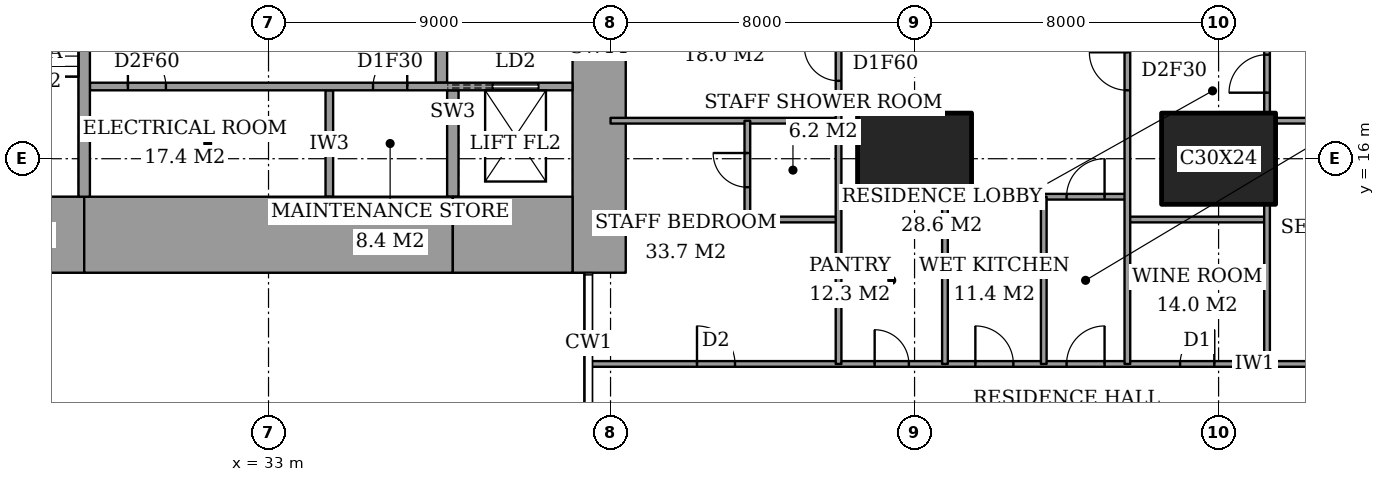
"""IFC4 building model, lengths in metres.
Left out: names, types, materials, properties, quantities, classifications, styles, units other than length and angle.
Written with IfcOpenShell. Run it as: python <this file> out.ifc"""

import sys

from ifc_helpers import new_model, si_unit, direction, frame, frame_2d, origin, origin_2d, place, context, subcontext, project, spatial, rectangle, extrude, element, fill, save


model = new_model("IFC4")
c1 = context("Model", 3, precision=1e-05, world=origin(), true_north=direction((0.0, 1.0)))
c2 = subcontext(c1, "Body", "Model", "MODEL_VIEW")
j1 = project(units=[si_unit("LENGTHUNIT", "METRE"), si_unit("PLANEANGLEUNIT", "RADIAN")], contexts=[c1])
p1 = place(None, origin())
s1 = spatial("IfcSite", under=j1, at=p1, CompositionType="ELEMENT")
p2 = place(p1, origin())
s2 = spatial("IfcBuilding", under=s1, at=p2, CompositionType="ELEMENT")
p3 = place(p2, frame((0.0, 0.0, 287.1)))
s3 = spatial("IfcBuildingStorey", under=s2, at=p3, CompositionType="ELEMENT", Elevation=287.1)
for number, where, z_axis, x_axis in (
    (1, (50.0, 16.0, 0.0), (0.0, 0.0, 1.0), (1.0, 0.0, 0.0)),
    (2, (58.0, 16.0, 0.0), (0.0, 0.0, 1.0), (1.0, 0.0, 0.0)),
):
    element("IfcColumn", number, at=place(p3, frame(where, z_axis=z_axis, x_axis=x_axis)), inside=s3, PredefinedType="COLUMN", context=c2, shape_type="SweptSolid", body=[
        extrude(rectangle(XDim=3.0, YDim=2.4, at=origin_2d()), origin(), (0.0, 0.0, 1.0), 4.5),
    ])
p4 = place(p3, frame((25.0, 14.0, 0.0), z_axis=(0.0, 0.0, 1.0), x_axis=(1.0, 0.0, 0.0)))
e3 = element("IfcWall", 3, at=p4, inside=s3, PredefinedType="SHEAR", context=c2, shape_type="SweptSolid", body=[
    extrude(rectangle(XDim=3.15, YDim=2.0, at=frame_2d((1.575, 0.0))), origin(), (0.0, 0.0, 1.0), 4.5),
])
p5 = place(p3, frame((28.15, 14.0, 0.0), z_axis=(0.0, 0.0, 1.0), x_axis=(1.0, 0.0, 0.0)))
e4 = element("IfcWall", 4, at=p5, inside=s3, PredefinedType="SHEAR", context=c2, shape_type="SweptSolid", body=[
    extrude(rectangle(XDim=9.7, YDim=2.0, at=frame_2d((4.85, 0.0))), origin(), (0.0, 0.0, 1.0), 4.5),
])
p6 = place(p3, frame((37.85, 14.0, 0.0), z_axis=(0.0, 0.0, 1.0), x_axis=(1.0, 0.0, 0.0)))
e5 = element("IfcWall", 5, at=p6, inside=s3, PredefinedType="SHEAR", context=c2, shape_type="SweptSolid", body=[
    extrude(rectangle(XDim=3.15, YDim=2.0, at=frame_2d((1.575, 0.0))), origin(), (0.0, 0.0, 1.0), 4.5),
])
p7 = place(p3, frame((41.7, 13.0, 0.0), z_axis=(0.0, 0.0, 1.0), x_axis=(0.0, 1.0, 0.0)))
e6 = element("IfcWall", 6, at=p7, inside=s3, PredefinedType="SHEAR", context=c2, shape_type="SweptSolid", body=[
    extrude(rectangle(XDim=11.85, YDim=1.4, at=frame_2d((5.925, 0.0))), origin(), (0.0, 0.0, 1.0), 4.5),
])
p8 = place(p7, frame((7.5, 0.0, 0.0)))
e7 = element("IfcOpeningElement", 7, at=p8, cuts=e6, PredefinedType="OPENING", context=c2, shape_type="SweptSolid", body=[
    extrude(rectangle(XDim=1.8, YDim=2.4, at=frame_2d((0.9, 1.2))), frame((0.0, 0.71, 0.0), z_axis=(0.0, -1.0, 0.0), x_axis=(1.0, 0.0, 0.0)), (0.0, 0.0, 1.0), 1.42),
])
p9 = place(p3, frame((28.15, 15.0, 0.0), z_axis=(0.0, 0.0, 1.0), x_axis=(0.0, 1.0, 0.0)))
e8 = element("IfcWall", 8, at=p9, inside=s3, PredefinedType="SHEAR", context=c2, shape_type="SweptSolid", body=[
    extrude(rectangle(XDim=8.15, YDim=0.3, at=frame_2d((4.075, 0.0))), origin(), (0.0, 0.0, 1.0), 4.5),
])
p10 = place(p3, frame((37.55, 18.0, 0.0), z_axis=(0.0, 0.0, 1.0), x_axis=(0.0, 1.0, 0.0)))
e9 = element("IfcWall", 9, at=p10, inside=s3, PredefinedType="PARTITIONING", context=c2, shape_type="SweptSolid", body=[
    extrude(rectangle(XDim=6.7, YDim=0.3, at=frame_2d((3.35, 0.0))), origin(), (0.0, 0.0, 1.0), 4.5),
])
p11 = place(p10, frame((2.8, 0.0, 0.0)))
e10 = element("IfcOpeningElement", 10, at=p11, cuts=e9, PredefinedType="OPENING", context=c2, shape_type="SweptSolid", body=[
    extrude(rectangle(XDim=1.2, YDim=2.1, at=frame_2d((0.6, 1.05))), frame((0.0, 0.16, 0.0), z_axis=(0.0, -1.0, 0.0), x_axis=(1.0, 0.0, 0.0)), (0.0, 0.0, 1.0), 0.32),
])
p12 = place(p3, frame((41.439, 10.6, 0.0), z_axis=(0.0, 0.0, 1.0), x_axis=(1.0, 0.0, 0.0)))
e11 = element("IfcWall", 11, at=p12, inside=s3, PredefinedType="PARTITIONING", context=c2, shape_type="SweptSolid", body=[
    extrude(rectangle(XDim=25.011, YDim=0.15, at=frame_2d((12.505, 0.0))), origin(), (0.0, 0.0, 1.0), 4.2),
])
p13 = place(p12, frame((12.561, 0.0, 0.0)))
e12 = element("IfcOpeningElement", 12, at=p13, cuts=e11, PredefinedType="OPENING", context=c2, shape_type="SweptSolid", body=[
    extrude(rectangle(XDim=1.0, YDim=2.1, at=frame_2d((0.5, 1.05))), frame((0.0, 0.085, 0.0), z_axis=(0.0, -1.0, 0.0), x_axis=(1.0, 0.0, 0.0)), (0.0, 0.0, 1.0), 0.17),
])
p14 = place(p12, frame((20.924, 0.0, 0.0)))
e13 = element("IfcOpeningElement", 13, at=p14, cuts=e11, PredefinedType="OPENING", context=c2, shape_type="SweptSolid", body=[
    extrude(rectangle(XDim=1.0, YDim=2.1, at=frame_2d((0.5, 1.05))), frame((0.0, 0.085, 0.0), z_axis=(0.0, -1.0, 0.0), x_axis=(1.0, 0.0, 0.0)), (0.0, 0.0, 1.0), 0.17),
])
p15 = place(p12, frame((15.549, 0.0, 0.0)))
e14 = element("IfcOpeningElement", 14, at=p15, cuts=e11, PredefinedType="OPENING", context=c2, shape_type="SweptSolid", body=[
    extrude(rectangle(XDim=0.9, YDim=2.1, at=frame_2d((0.45, 1.05))), frame((0.0, 0.085, 0.0), z_axis=(0.0, -1.0, 0.0), x_axis=(1.0, 0.0, 0.0)), (0.0, 0.0, 1.0), 0.17),
])
p16 = place(p12, frame((10.161, 0.0, 0.0)))
e15 = element("IfcOpeningElement", 15, at=p16, cuts=e11, PredefinedType="OPENING", context=c2, shape_type="SweptSolid", body=[
    extrude(rectangle(XDim=1.0, YDim=2.1, at=frame_2d((0.5, 1.05))), frame((0.0, 0.085, 0.0), z_axis=(0.0, -1.0, 0.0), x_axis=(1.0, 0.0, 0.0)), (0.0, 0.0, 1.0), 0.17),
])
p17 = place(p12, frame((7.511, 0.0, 0.0)))
e16 = element("IfcOpeningElement", 16, at=p17, cuts=e11, PredefinedType="OPENING", context=c2, shape_type="SweptSolid", body=[
    extrude(rectangle(XDim=0.9, YDim=2.1, at=frame_2d((0.45, 1.05))), frame((0.0, 0.085, 0.0), z_axis=(0.0, -1.0, 0.0), x_axis=(1.0, 0.0, 0.0)), (0.0, 0.0, 1.0), 0.17),
])
p18 = place(p12, frame((2.836, 0.0, 0.0)))
e17 = element("IfcOpeningElement", 17, at=p18, cuts=e11, PredefinedType="OPENING", context=c2, shape_type="SweptSolid", body=[
    extrude(rectangle(XDim=1.0, YDim=2.1, at=frame_2d((0.5, 1.05))), frame((0.0, 0.085, 0.0), z_axis=(0.0, -1.0, 0.0), x_axis=(1.0, 0.0, 0.0)), (0.0, 0.0, 1.0), 0.17),
])
p19 = place(p3, frame((45.6, 14.4, 0.0), z_axis=(0.0, 0.0, 1.0), x_axis=(1.0, 0.0, 0.0)))
e18 = element("IfcWall", 18, at=p19, inside=s3, PredefinedType="PARTITIONING", context=c2, shape_type="SweptSolid", body=[
    extrude(rectangle(XDim=2.4, YDim=0.15, at=frame_2d((1.2, 0.0))), origin(), (0.0, 0.0, 1.0), 4.2),
])
p20 = place(p3, frame((55.6, 14.4, 0.0), z_axis=(0.0, 0.0, 1.0), x_axis=(1.0, 0.0, 0.0)))
e19 = element("IfcWall", 19, at=p20, inside=s3, PredefinedType="PARTITIONING", context=c2, shape_type="SweptSolid", body=[
    extrude(rectangle(XDim=3.675, YDim=0.15, at=frame_2d((1.837, 0.0))), origin(), (0.0, 0.0, 1.0), 4.2),
])
p21 = place(p3, frame((48.0, 15.0, 0.0), z_axis=(0.0, 0.0, 1.0), x_axis=(1.0, 0.0, 0.0)))
e20 = element("IfcWall", 20, at=p21, inside=s3, PredefinedType="PARTITIONING", context=c2, shape_type="SweptSolid", body=[
    extrude(rectangle(XDim=0.5, YDim=0.15, at=frame_2d((0.25, 0.0))), origin(), (0.0, 0.0, 1.0), 4.2),
])
p22 = place(p3, frame((51.5, 15.0, 0.0), z_axis=(0.0, 0.0, 1.0), x_axis=(1.0, 0.0, 0.0)))
e21 = element("IfcWall", 21, at=p22, inside=s3, PredefinedType="PARTITIONING", context=c2, shape_type="SweptSolid", body=[
    extrude(rectangle(XDim=4.1, YDim=0.15, at=frame_2d((2.05, 0.0))), origin(), (0.0, 0.0, 1.0), 4.2),
])
p23 = place(p22, frame((2.5, 0.0, 0.0)))
e22 = element("IfcOpeningElement", 22, at=p23, cuts=e21, PredefinedType="OPENING", context=c2, shape_type="SweptSolid", body=[
    extrude(rectangle(XDim=1.0, YDim=2.1, at=frame_2d((0.5, 1.05))), frame((0.0, 0.085, 0.0), z_axis=(0.0, -1.0, 0.0), x_axis=(1.0, 0.0, 0.0)), (0.0, 0.0, 1.0), 0.17),
])
p24 = place(p3, frame((42.0, 17.0, 0.0), z_axis=(0.0, 0.0, 1.0), x_axis=(1.0, 0.0, 0.0)))
e23 = element("IfcWall", 23, at=p24, inside=s3, PredefinedType="PARTITIONING", context=c2, shape_type="SweptSolid", body=[
    extrude(rectangle(XDim=6.0, YDim=0.15, at=frame_2d((3.0, 0.0))), origin(), (0.0, 0.0, 1.0), 4.2),
])
p25 = place(p3, frame((59.5, 17.0, 0.0), z_axis=(0.0, 0.0, 1.0), x_axis=(1.0, 0.0, 0.0)))
e24 = element("IfcWall", 24, at=p25, inside=s3, PredefinedType="PARTITIONING", context=c2, shape_type="SweptSolid", body=[
    extrude(rectangle(XDim=6.95, YDim=0.15, at=frame_2d((3.475, 0.0))), origin(), (0.0, 0.0, 1.0), 4.2),
])
p26 = place(p3, frame((45.6, 14.4, 0.0), z_axis=(0.0, 0.0, 1.0), x_axis=(0.0, 1.0, 0.0)))
e25 = element("IfcWall", 25, at=p26, inside=s3, PredefinedType="PARTITIONING", context=c2, shape_type="SweptSolid", body=[
    extrude(rectangle(XDim=2.6, YDim=0.15, at=frame_2d((1.3, 0.0))), origin(), (0.0, 0.0, 1.0), 4.2),
])
p27 = place(p26, frame((0.85, 0.0, 0.0)))
e26 = element("IfcOpeningElement", 26, at=p27, cuts=e25, PredefinedType="OPENING", context=c2, shape_type="SweptSolid", body=[
    extrude(rectangle(XDim=0.9, YDim=2.1, at=frame_2d((0.45, 1.05))), frame((0.0, 0.085, 0.0), z_axis=(0.0, -1.0, 0.0), x_axis=(1.0, 0.0, 0.0)), (0.0, 0.0, 1.0), 0.17),
])
p28 = place(p3, frame((48.0, 10.6, 0.0), z_axis=(0.0, 0.0, 1.0), x_axis=(0.0, 1.0, 0.0)))
e27 = element("IfcWall", 27, at=p28, inside=s3, PredefinedType="PARTITIONING", context=c2, shape_type="SweptSolid", body=[
    extrude(rectangle(XDim=13.4, YDim=0.15, at=frame_2d((6.7, 0.0))), origin(), (0.0, 0.0, 1.0), 4.2),
])
p29 = place(p28, frame((10.8, 0.0, 0.0)))
e28 = element("IfcOpeningElement", 28, at=p29, cuts=e27, PredefinedType="OPENING", context=c2, shape_type="SweptSolid", body=[
    extrude(rectangle(XDim=1.2, YDim=2.4, at=frame_2d((0.6, 1.2))), frame((0.0, 0.085, 0.0), z_axis=(0.0, -1.0, 0.0), x_axis=(1.0, 0.0, 0.0)), (0.0, 0.0, 1.0), 0.17),
])
p30 = place(p28, frame((7.45, 0.0, 0.0)))
e29 = element("IfcOpeningElement", 29, at=p30, cuts=e27, PredefinedType="OPENING", context=c2, shape_type="SweptSolid", body=[
    extrude(rectangle(XDim=0.9, YDim=2.1, at=frame_2d((0.45, 1.05))), frame((0.0, 0.085, 0.0), z_axis=(0.0, -1.0, 0.0), x_axis=(1.0, 0.0, 0.0)), (0.0, 0.0, 1.0), 0.17),
])
p31 = place(p3, frame((50.8, 10.6, 0.0), z_axis=(0.0, 0.0, 1.0), x_axis=(0.0, 1.0, 0.0)))
e30 = element("IfcWall", 30, at=p31, inside=s3, PredefinedType="PARTITIONING", context=c2, shape_type="SweptSolid", body=[
    extrude(rectangle(XDim=4.2, YDim=0.15, at=frame_2d((2.1, 0.0))), origin(), (0.0, 0.0, 1.0), 4.2),
])
p32 = place(p3, frame((53.4, 10.6, 0.0), z_axis=(0.0, 0.0, 1.0), x_axis=(0.0, 1.0, 0.0)))
e31 = element("IfcWall", 31, at=p32, inside=s3, PredefinedType="PARTITIONING", context=c2, shape_type="SweptSolid", body=[
    extrude(rectangle(XDim=4.4, YDim=0.15, at=frame_2d((2.2, 0.0))), origin(), (0.0, 0.0, 1.0), 4.2),
])
p33 = place(p3, frame((55.6, 10.6, 0.0), z_axis=(0.0, 0.0, 1.0), x_axis=(0.0, 1.0, 0.0)))
e32 = element("IfcWall", 32, at=p33, inside=s3, PredefinedType="PARTITIONING", context=c2, shape_type="SweptSolid", body=[
    extrude(rectangle(XDim=11.0, YDim=0.15, at=frame_2d((5.5, 0.0))), origin(), (0.0, 0.0, 1.0), 4.2),
])
p34 = place(p33, frame((7.2, 0.0, 0.0)))
e33 = element("IfcOpeningElement", 33, at=p34, cuts=e32, PredefinedType="OPENING", context=c2, shape_type="SweptSolid", body=[
    extrude(rectangle(XDim=1.0, YDim=2.1, at=frame_2d((0.5, 1.05))), frame((0.0, 0.085, 0.0), z_axis=(0.0, -1.0, 0.0), x_axis=(1.0, 0.0, 0.0)), (0.0, 0.0, 1.0), 0.17),
])
p35 = place(p3, frame((59.275, 10.6, 0.0), z_axis=(0.0, 0.0, 1.0), x_axis=(0.0, 1.0, 0.0)))
e34 = element("IfcWall", 34, at=p35, inside=s3, PredefinedType="PARTITIONING", context=c2, shape_type="SweptSolid", body=[
    extrude(rectangle(XDim=4.2, YDim=0.15, at=frame_2d((2.1, 0.0))), origin(), (0.0, 0.0, 1.0), 4.2),
])
p36 = place(p3, frame((59.275, 17.2, 0.0), z_axis=(0.0, 0.0, 1.0), x_axis=(0.0, 1.0, 0.0)))
e35 = element("IfcWall", 35, at=p36, inside=s3, PredefinedType="PARTITIONING", context=c2, shape_type="SweptSolid", body=[
    extrude(rectangle(XDim=2.45, YDim=0.15, at=frame_2d((1.225, 0.0))), origin(), (0.0, 0.0, 1.0), 4.2),
])
p37 = place(p36, frame((0.538, 0.0, 0.0)))
e36 = element("IfcOpeningElement", 36, at=p37, cuts=e35, PredefinedType="OPENING", context=c2, shape_type="SweptSolid", body=[
    extrude(rectangle(XDim=1.0, YDim=2.1, at=frame_2d((0.5, 1.05))), frame((0.0, 0.085, 0.0), z_axis=(0.0, -1.0, 0.0), x_axis=(1.0, 0.0, 0.0)), (0.0, 0.0, 1.0), 0.17),
])
p38 = place(p3, frame((28.3, 17.9, 0.0), z_axis=(0.0, 0.0, 1.0), x_axis=(1.0, 0.0, 0.0)))
e37 = element("IfcWall", 37, at=p38, inside=s3, PredefinedType="PARTITIONING", context=c2, shape_type="SweptSolid", body=[
    extrude(rectangle(XDim=12.7, YDim=0.2, at=frame_2d((6.35, 0.0))), origin(), (0.0, 0.0, 1.0), 4.5),
])
p39 = place(p38, frame((1.0, 0.0, 0.0)))
e38 = element("IfcOpeningElement", 38, at=p39, cuts=e37, PredefinedType="OPENING", context=c2, shape_type="SweptSolid", body=[
    extrude(rectangle(XDim=1.0, YDim=2.1, at=frame_2d((0.5, 1.05))), frame((0.0, 0.11, 0.0), z_axis=(0.0, -1.0, 0.0), x_axis=(1.0, 0.0, 0.0)), (0.0, 0.0, 1.0), 0.22),
])
p40 = place(p38, frame((7.45, 0.0, 0.0)))
e39 = element("IfcOpeningElement", 39, at=p40, cuts=e37, PredefinedType="OPENING", context=c2, shape_type="SweptSolid", body=[
    extrude(rectangle(XDim=0.9, YDim=2.1, at=frame_2d((0.45, 1.05))), frame((0.0, 0.11, 0.0), z_axis=(0.0, -1.0, 0.0), x_axis=(1.0, 0.0, 0.0)), (0.0, 0.0, 1.0), 0.22),
])
p41 = place(p38, frame((10.6, 0.0, 0.0)))
e40 = element("IfcOpeningElement", 40, at=p41, cuts=e37, PredefinedType="OPENING", context=c2, shape_type="SweptSolid", body=[
    extrude(rectangle(XDim=1.2, YDim=2.1, at=frame_2d((0.6, 1.05))), frame((0.0, 0.11, 0.0), z_axis=(0.0, -1.0, 0.0), x_axis=(1.0, 0.0, 0.0)), (0.0, 0.0, 1.0), 0.22),
])
p42 = place(p3, frame((34.6, 15.0, 0.0), z_axis=(0.0, 0.0, 1.0), x_axis=(0.0, 1.0, 0.0)))
e41 = element("IfcWall", 41, at=p42, inside=s3, PredefinedType="PARTITIONING", context=c2, shape_type="SweptSolid", body=[
    extrude(rectangle(XDim=2.8, YDim=0.2, at=frame_2d((1.4, 0.0))), origin(), (0.0, 0.0, 1.0), 4.5),
])
p43 = place(p3, frame((37.85, 15.0, 0.0), z_axis=(0.0, 0.0, 1.0), x_axis=(0.0, 1.0, 0.0)))
e42 = element("IfcWall", 42, at=p43, inside=s3, PredefinedType="SHEAR", context=c2, shape_type="SweptSolid", body=[
    extrude(rectangle(XDim=2.8, YDim=0.3, at=frame_2d((1.4, 0.0))), origin(), (0.0, 0.0, 1.0), 4.5),
])
p44 = place(p13, origin())
e43 = element("IfcDoor", 43, at=p44, inside=s3, OperationType="SINGLE_SWING_LEFT", PredefinedType="DOOR", context=c2, shape_type="SweptSolid", body=[
    extrude(rectangle(XDim=1.0, YDim=2.1, at=frame_2d((0.5, 1.05))), frame((0.0, 0.025, 0.0), z_axis=(0.0, -1.0, 0.0), x_axis=(1.0, 0.0, 0.0)), (0.0, 0.0, 1.0), 0.05),
])
fill(e12, e43)
p45 = place(p37, origin())
e44 = element("IfcDoor", 44, at=p45, inside=s3, OperationType="SINGLE_SWING_RIGHT", PredefinedType="DOOR", context=c2, shape_type="SweptSolid", body=[
    extrude(rectangle(XDim=1.0, YDim=2.1, at=frame_2d((0.5, 1.05))), frame((0.0, 0.025, 0.0), z_axis=(0.0, -1.0, 0.0), x_axis=(1.0, 0.0, 0.0)), (0.0, 0.0, 1.0), 0.05),
])
fill(e36, e44)
p46 = place(p15, origin())
e45 = element("IfcDoor", 45, at=p46, inside=s3, OperationType="SINGLE_SWING_LEFT", PredefinedType="DOOR", context=c2, shape_type="SweptSolid", body=[
    extrude(rectangle(XDim=0.9, YDim=2.1, at=frame_2d((0.45, 1.05))), frame((0.0, 0.025, 0.0), z_axis=(0.0, -1.0, 0.0), x_axis=(1.0, 0.0, 0.0)), (0.0, 0.0, 1.0), 0.05),
])
fill(e14, e45)
p47 = place(p34, origin())
e46 = element("IfcDoor", 46, at=p47, inside=s3, OperationType="SINGLE_SWING_LEFT", PredefinedType="DOOR", context=c2, shape_type="SweptSolid", body=[
    extrude(rectangle(XDim=1.0, YDim=2.1, at=frame_2d((0.5, 1.05))), frame((0.0, 0.025, 0.0), z_axis=(0.0, -1.0, 0.0), x_axis=(1.0, 0.0, 0.0)), (0.0, 0.0, 1.0), 0.05),
])
fill(e33, e46)
p48 = place(p23, origin())
e47 = element("IfcDoor", 47, at=p48, inside=s3, OperationType="SINGLE_SWING_LEFT", PredefinedType="DOOR", context=c2, shape_type="SweptSolid", body=[
    extrude(rectangle(XDim=1.0, YDim=2.1, at=frame_2d((0.5, 1.05))), frame((0.0, 0.025, 0.0), z_axis=(0.0, -1.0, 0.0), x_axis=(1.0, 0.0, 0.0)), (0.0, 0.0, 1.0), 0.05),
])
fill(e22, e47)
p49 = place(p16, origin())
e48 = element("IfcDoor", 48, at=p49, inside=s3, OperationType="SINGLE_SWING_RIGHT", PredefinedType="DOOR", context=c2, shape_type="SweptSolid", body=[
    extrude(rectangle(XDim=1.0, YDim=2.1, at=frame_2d((0.5, 1.05))), frame((0.0, 0.025, 0.0), z_axis=(0.0, -1.0, 0.0), x_axis=(1.0, 0.0, 0.0)), (0.0, 0.0, 1.0), 0.05),
])
fill(e15, e48)
p50 = place(p17, origin())
e49 = element("IfcDoor", 49, at=p50, inside=s3, OperationType="SINGLE_SWING_RIGHT", PredefinedType="DOOR", context=c2, shape_type="SweptSolid", body=[
    extrude(rectangle(XDim=0.9, YDim=2.1, at=frame_2d((0.45, 1.05))), frame((0.0, 0.025, 0.0), z_axis=(0.0, -1.0, 0.0), x_axis=(1.0, 0.0, 0.0)), (0.0, 0.0, 1.0), 0.05),
])
fill(e16, e49)
p51 = place(p27, origin())
e50 = element("IfcDoor", 50, at=p51, inside=s3, OperationType="SINGLE_SWING_LEFT", PredefinedType="DOOR", context=c2, shape_type="SweptSolid", body=[
    extrude(rectangle(XDim=0.9, YDim=2.1, at=frame_2d((0.45, 1.05))), frame((0.0, 0.025, 0.0), z_axis=(0.0, -1.0, 0.0), x_axis=(1.0, 0.0, 0.0)), (0.0, 0.0, 1.0), 0.05),
])
fill(e26, e50)
p52 = place(p18, origin())
e51 = element("IfcDoor", 51, at=p52, inside=s3, OperationType="SINGLE_SWING_RIGHT", PredefinedType="DOOR", context=c2, shape_type="SweptSolid", body=[
    extrude(rectangle(XDim=1.0, YDim=2.1, at=frame_2d((0.5, 1.05))), frame((0.0, 0.025, 0.0), z_axis=(0.0, -1.0, 0.0), x_axis=(1.0, 0.0, 0.0)), (0.0, 0.0, 1.0), 0.05),
])
fill(e17, e51)
p53 = place(p30, origin())
e52 = element("IfcDoor", 52, at=p53, inside=s3, OperationType="SINGLE_SWING_LEFT", PredefinedType="DOOR", context=c2, shape_type="SweptSolid", body=[
    extrude(rectangle(XDim=0.9, YDim=2.1, at=frame_2d((0.45, 1.05))), frame((0.0, 0.025, 0.0), z_axis=(0.0, -1.0, 0.0), x_axis=(1.0, 0.0, 0.0)), (0.0, 0.0, 1.0), 0.05),
])
fill(e29, e52)
p54 = place(p39, origin())
e53 = element("IfcDoor", 53, at=p54, inside=s3, OperationType="SINGLE_SWING_RIGHT", PredefinedType="DOOR", context=c2, shape_type="SweptSolid", body=[
    extrude(rectangle(XDim=1.0, YDim=2.1, at=frame_2d((0.5, 1.05))), frame((0.0, 0.025, 0.0), z_axis=(0.0, -1.0, 0.0), x_axis=(1.0, 0.0, 0.0)), (0.0, 0.0, 1.0), 0.05),
])
fill(e38, e53)
p55 = place(p40, origin())
e54 = element("IfcDoor", 54, at=p55, inside=s3, OperationType="SINGLE_SWING_LEFT", PredefinedType="DOOR", context=c2, shape_type="SweptSolid", body=[
    extrude(rectangle(XDim=0.9, YDim=2.1, at=frame_2d((0.45, 1.05))), frame((0.0, 0.025, 0.0), z_axis=(0.0, -1.0, 0.0), x_axis=(1.0, 0.0, 0.0)), (0.0, 0.0, 1.0), 0.05),
])
fill(e39, e54)
p56 = place(p41, origin())
e55 = element("IfcDoor", 55, at=p56, inside=s3, OperationType="SLIDING_TO_LEFT", PredefinedType="DOOR", context=c2, shape_type="SweptSolid", body=[
    extrude(rectangle(XDim=1.2, YDim=2.1, at=frame_2d((0.6, 1.05))), frame((0.0, 0.025, 0.0), z_axis=(0.0, -1.0, 0.0), x_axis=(1.0, 0.0, 0.0)), (0.0, 0.0, 1.0), 0.05),
])
fill(e40, e55)
save(model, sys.argv[1])
